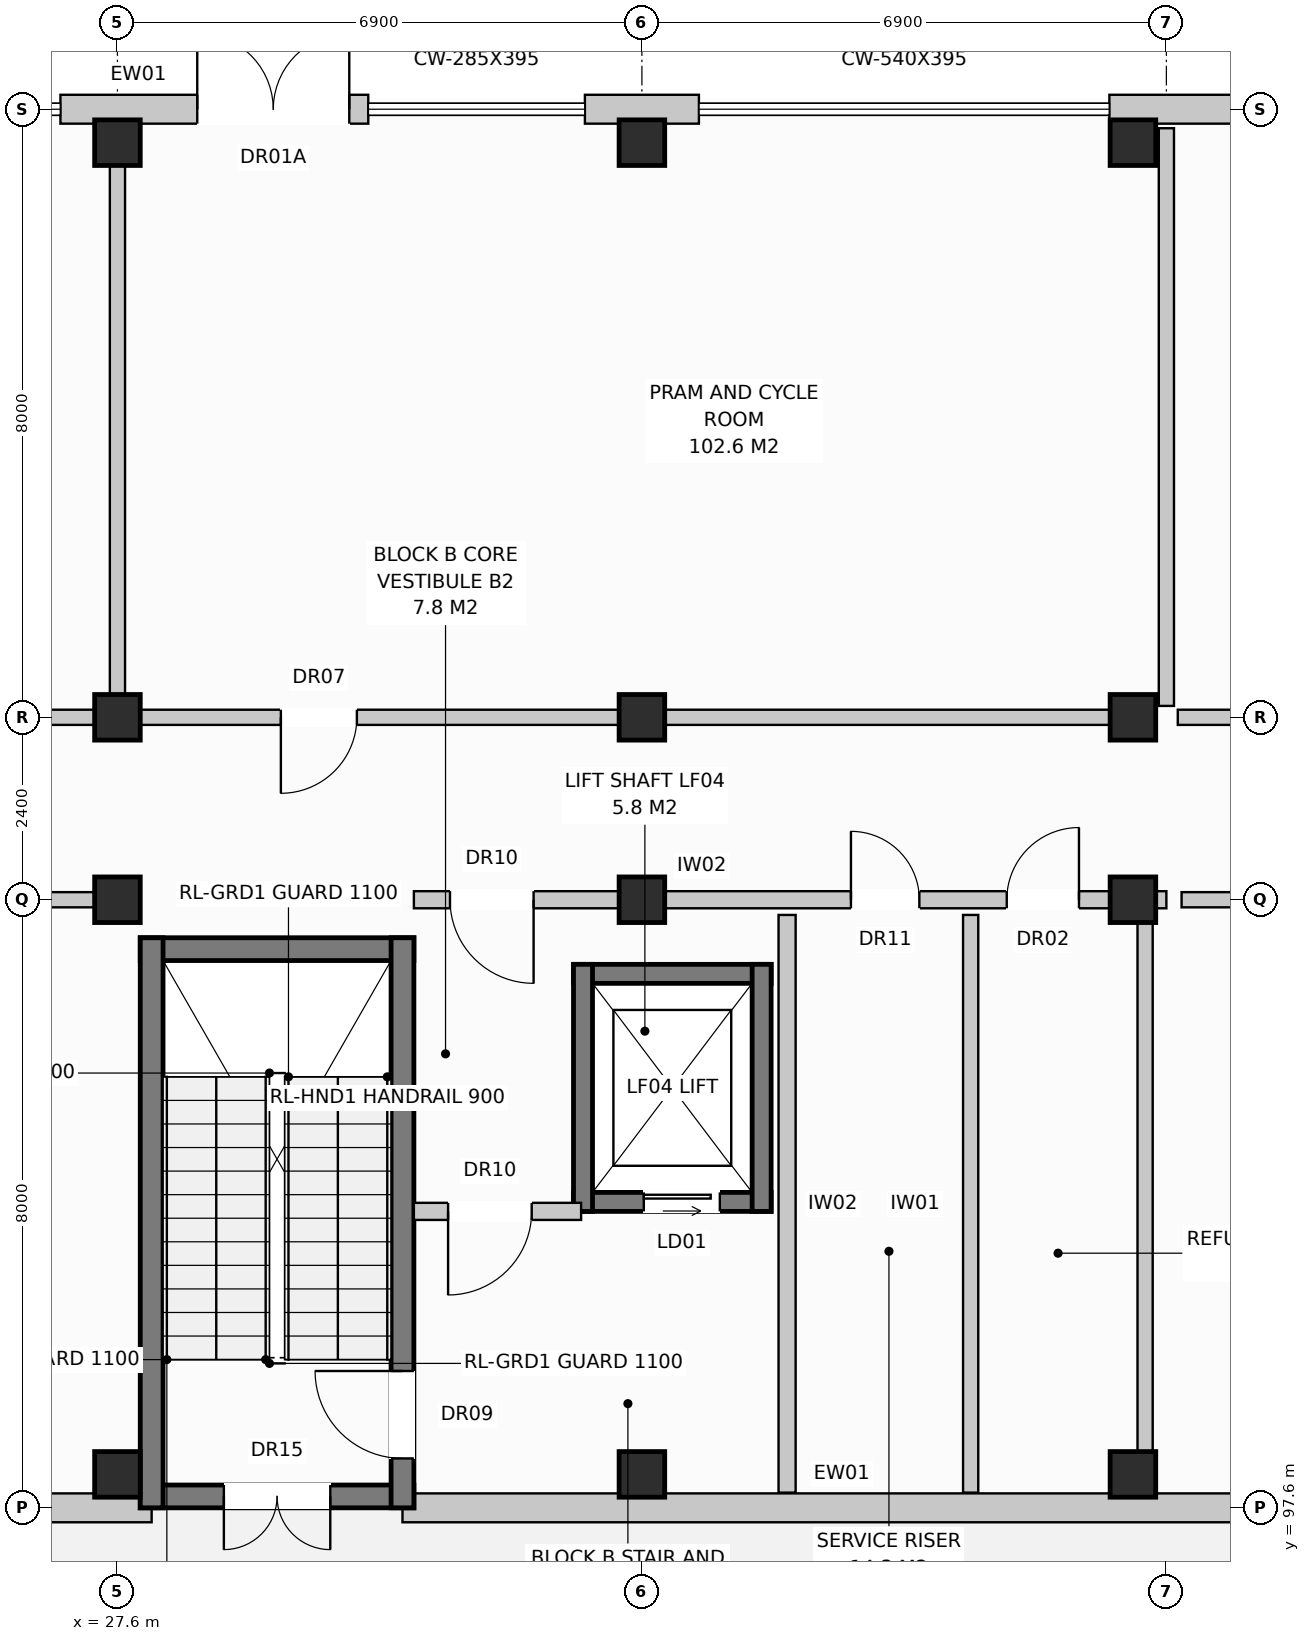
"""IFC4 building model, lengths in metres.
Left out: names, types, materials, properties, quantities, classifications, styles, units other than length and angle.
Written with IfcOpenShell. Run it as: python <this file> out.ifc"""

import sys

from ifc_helpers import new_model, si_unit, direction, frame, frame_2d, origin, origin_with_axes, origin_2d, place, context, subcontext, project, spatial, rectangle, extrude, element, fill, save


model = new_model("IFC4")
c1 = context("Model", 3, precision=1e-05, world=origin(), true_north=direction((0.0, 1.0)))
c2 = subcontext(c1, "Body", "Model", "MODEL_VIEW")
j1 = project(units=[si_unit("LENGTHUNIT", "METRE"), si_unit("PLANEANGLEUNIT", "RADIAN")], contexts=[c1])
p1 = place(None, origin())
s1 = spatial("IfcSite", under=j1, at=p1, CompositionType="ELEMENT")
p2 = place(p1, origin())
s2 = spatial("IfcBuilding", under=s1, at=p2, CompositionType="ELEMENT")
p3 = place(p2, origin())
s3 = spatial("IfcBuildingStorey", under=s2, at=p3, CompositionType="ELEMENT", Elevation=0.0)
for number, where, z_axis, x_axis in (
    (1, (27.6, 98.04, 0.0), (0.0, 0.0, 1.0), (1.0, 0.0, 0.0)),
    (2, (27.6, 105.6, 0.0), (0.0, 0.0, 1.0), (1.0, 0.0, 0.0)),
    (3, (27.6, 108.0, 0.0), (0.0, 0.0, 1.0), (1.0, 0.0, 0.0)),
    (4, (27.6, 115.56, 0.0), (0.0, 0.0, 1.0), (1.0, 0.0, 0.0)),
    (5, (34.5, 98.04, 0.0), (0.0, 0.0, 1.0), (1.0, 0.0, 0.0)),
    (6, (34.5, 105.6, 0.0), (0.0, 0.0, 1.0), (1.0, 0.0, 0.0)),
    (7, (34.5, 108.0, 0.0), (0.0, 0.0, 1.0), (1.0, 0.0, 0.0)),
    (8, (34.5, 115.56, 0.0), (0.0, 0.0, 1.0), (1.0, 0.0, 0.0)),
    (9, (40.96, 98.04, 0.0), (0.0, 0.0, 1.0), (1.0, 0.0, 0.0)),
    (10, (40.96, 105.6, 0.0), (0.0, 0.0, 1.0), (1.0, 0.0, 0.0)),
    (11, (40.96, 108.0, 0.0), (0.0, 0.0, 1.0), (1.0, 0.0, 0.0)),
    (12, (40.96, 115.56, 0.0), (0.0, 0.0, 1.0), (1.0, 0.0, 0.0)),
):
    element("IfcColumn", number, at=place(p3, frame(where, z_axis=z_axis, x_axis=x_axis)), inside=s3, PredefinedType="COLUMN", context=c2, shape_type="SweptSolid", body=[
        extrude(rectangle(XDim=0.6, YDim=0.6, at=origin_2d()), origin(), (0.0, 0.0, 1.0), 4.4),
    ])
p4 = place(p3, frame((26.65, 97.6, 0.0), z_axis=(0.0, 0.0, 1.0), x_axis=(1.0, 0.0, 0.0)))
e13 = element("IfcWall", 13, at=p4, inside=s3, PredefinedType="STANDARD", context=c2, shape_type="SweptSolid", body=[
    extrude(rectangle(XDim=1.4, YDim=0.38, at=frame_2d((0.7, 0.0))), origin(), (0.0, 0.0, 1.0), 4.12),
])
p5 = place(p3, frame((31.35, 97.6, 0.0), z_axis=(0.0, 0.0, 1.0), x_axis=(1.0, 0.0, 0.0)))
e14 = element("IfcWall", 14, at=p5, inside=s3, PredefinedType="STANDARD", context=c2, shape_type="SweptSolid", body=[
    extrude(rectangle(XDim=11.0, YDim=0.38, at=frame_2d((5.5, 0.0))), origin(), (0.0, 0.0, 1.0), 4.12),
])
p6 = place(p3, frame((26.85, 116.0, 0.0), z_axis=(0.0, 0.0, 1.0), x_axis=(1.0, 0.0, 0.0)))
e15 = element("IfcWall", 15, at=p6, inside=s3, PredefinedType="STANDARD", context=c2, shape_type="SweptSolid", body=[
    extrude(rectangle(XDim=4.05, YDim=0.38, at=frame_2d((2.025, 0.0))), origin(), (0.0, 0.0, 1.0), 4.12),
])
p7 = place(p6, frame((1.8, 0.0, 0.0)))
e16 = element("IfcOpeningElement", 16, at=p7, cuts=e15, PredefinedType="OPENING", context=c2, shape_type="SweptSolid", body=[
    extrude(rectangle(XDim=2.0, YDim=2.45, at=frame_2d((1.0, 1.225))), frame((0.0, 0.202, 0.0), z_axis=(0.0, -1.0, 0.0), x_axis=(1.0, 0.0, 0.0)), (0.0, 0.0, 1.0), 0.404),
])
p8 = place(p3, frame((33.75, 116.0, 0.0), z_axis=(0.0, 0.0, 1.0), x_axis=(1.0, 0.0, 0.0)))
e17 = element("IfcWall", 17, at=p8, inside=s3, PredefinedType="STANDARD", context=c2, shape_type="SweptSolid", body=[
    extrude(rectangle(XDim=1.5, YDim=0.38, at=frame_2d((0.75, 0.0))), origin(), (0.0, 0.0, 1.0), 4.12),
])
p9 = place(p3, frame((40.65, 116.0, 0.0), z_axis=(0.0, 0.0, 1.0), x_axis=(1.0, 0.0, 0.0)))
e18 = element("IfcWall", 18, at=p9, inside=s3, PredefinedType="STANDARD", context=c2, shape_type="SweptSolid", body=[
    extrude(rectangle(XDim=4.05, YDim=0.38, at=frame_2d((2.025, 0.0))), origin(), (0.0, 0.0, 1.0), 4.12),
])
p10 = place(p9, frame((1.8, 0.0, 0.0)))
e19 = element("IfcOpeningElement", 19, at=p10, cuts=e18, PredefinedType="OPENING", context=c2, shape_type="SweptSolid", body=[
    extrude(rectangle(XDim=2.0, YDim=2.45, at=frame_2d((1.0, 1.225))), frame((0.0, 0.202, 0.0), z_axis=(0.0, -1.0, 0.0), x_axis=(1.0, 0.0, 0.0)), (0.0, 0.0, 1.0), 0.404),
])
p11 = place(p3, frame((27.9, 97.75, 0.0), z_axis=(0.0, 0.0, 1.0), x_axis=(1.0, 0.0, 0.0)))
e20 = element("IfcWall", 20, at=p11, inside=s3, PredefinedType="SHEAR", context=c2, shape_type="SweptSolid", body=[
    extrude(rectangle(XDim=3.6, YDim=0.3, at=frame_2d((1.8, 0.0))), origin(), (0.0, 0.0, 1.0), 4.12),
])
p12 = place(p11, frame((1.1, 0.0, 0.0)))
e21 = element("IfcOpeningElement", 21, at=p12, cuts=e20, PredefinedType="OPENING", context=c2, shape_type="SweptSolid", body=[
    extrude(rectangle(XDim=1.4, YDim=2.25, at=frame_2d((0.7, 1.125))), frame((0.0, 0.162, 0.0), z_axis=(0.0, -1.0, 0.0), x_axis=(1.0, 0.0, 0.0)), (0.0, 0.0, 1.0), 0.324),
])
p13 = place(p3, frame((27.9, 104.95, 0.0), z_axis=(0.0, 0.0, 1.0), x_axis=(1.0, 0.0, 0.0)))
e22 = element("IfcWall", 22, at=p13, inside=s3, PredefinedType="SHEAR", context=c2, shape_type="SweptSolid", body=[
    extrude(rectangle(XDim=3.6, YDim=0.3, at=frame_2d((1.8, 0.0))), origin(), (0.0, 0.0, 1.0), 4.12),
])
p14 = place(p3, frame((28.05, 97.6, 0.0), z_axis=(0.0, 0.0, 1.0), x_axis=(0.0, 1.0, 0.0)))
e23 = element("IfcWall", 23, at=p14, inside=s3, PredefinedType="SHEAR", context=c2, shape_type="SweptSolid", body=[
    extrude(rectangle(XDim=7.5, YDim=0.3, at=frame_2d((3.75, 0.0))), origin(), (0.0, 0.0, 1.0), 4.12),
])
p15 = place(p3, frame((31.35, 97.6, 0.0), z_axis=(0.0, 0.0, 1.0), x_axis=(0.0, 1.0, 0.0)))
e24 = element("IfcWall", 24, at=p15, inside=s3, PredefinedType="SHEAR", context=c2, shape_type="SweptSolid", body=[
    extrude(rectangle(XDim=7.5, YDim=0.3, at=frame_2d((3.75, 0.0))), origin(), (0.0, 0.0, 1.0), 4.12),
])
p16 = place(p15, frame((0.65, 0.0, 0.0)))
e25 = element("IfcOpeningElement", 25, at=p16, cuts=e24, PredefinedType="OPENING", context=c2, shape_type="SweptSolid", body=[
    extrude(rectangle(XDim=1.15, YDim=2.15, at=frame_2d((0.575, 1.075))), frame((0.0, 0.162, 0.0), z_axis=(0.0, -1.0, 0.0), x_axis=(1.0, 0.0, 0.0)), (0.0, 0.0, 1.0), 0.324),
])
p17 = place(p3, frame((33.6, 101.625, 0.0), z_axis=(0.0, 0.0, 1.0), x_axis=(1.0, 0.0, 0.0)))
e26 = element("IfcWall", 26, at=p17, inside=s3, PredefinedType="SHEAR", context=c2, shape_type="SweptSolid", body=[
    extrude(rectangle(XDim=2.6, YDim=0.25, at=frame_2d((1.3, 0.0))), origin(), (0.0, 0.0, 1.0), 4.12),
])
p18 = place(p17, frame((0.925, 0.0, 0.0)))
e27 = element("IfcOpeningElement", 27, at=p18, cuts=e26, PredefinedType="OPENING", context=c2, shape_type="SweptSolid", body=[
    extrude(rectangle(XDim=1.0, YDim=2.1, at=frame_2d((0.5, 1.05))), frame((0.0, 0.137, 0.0), z_axis=(0.0, -1.0, 0.0), x_axis=(1.0, 0.0, 0.0)), (0.0, 0.0, 1.0), 0.274),
])
p19 = place(p3, frame((33.6, 104.625, 0.0), z_axis=(0.0, 0.0, 1.0), x_axis=(1.0, 0.0, 0.0)))
e28 = element("IfcWall", 28, at=p19, inside=s3, PredefinedType="SHEAR", context=c2, shape_type="SweptSolid", body=[
    extrude(rectangle(XDim=2.6, YDim=0.25, at=frame_2d((1.3, 0.0))), origin(), (0.0, 0.0, 1.0), 4.12),
])
for number, where, z_axis, x_axis in (
    (29, (33.725, 101.5, 0.0), (0.0, 0.0, 1.0), (0.0, 1.0, 0.0)),
    (30, (36.075, 101.5, 0.0), (0.0, 0.0, 1.0), (0.0, 1.0, 0.0)),
):
    element("IfcWall", number, at=place(p3, frame(where, z_axis=z_axis, x_axis=x_axis)), inside=s3, PredefinedType="SHEAR", context=c2, shape_type="SweptSolid", body=[
        extrude(rectangle(XDim=3.25, YDim=0.25, at=frame_2d((1.625, 0.0))), origin(), (0.0, 0.0, 1.0), 4.12),
    ])
p20 = place(p3, frame((36.41, 97.8, 0.0), z_axis=(0.0, 0.0, 1.0), x_axis=(0.0, 1.0, 0.0)))
e31 = element("IfcWall", 31, at=p20, inside=s3, PredefinedType="PARTITIONING", context=c2, shape_type="SweptSolid", body=[
    extrude(rectangle(XDim=7.6, YDim=0.225, at=frame_2d((3.8, 0.0))), origin(), (0.0, 0.0, 1.0), 4.12),
])
p21 = place(p3, frame((31.5, 101.5, 0.0), z_axis=(0.0, 0.0, 1.0), x_axis=(1.0, 0.0, 0.0)))
e32 = element("IfcWall", 32, at=p21, inside=s3, PredefinedType="PARTITIONING", context=c2, shape_type="SweptSolid", body=[
    extrude(rectangle(XDim=2.2, YDim=0.225, at=frame_2d((1.1, 0.0))), origin(), (0.0, 0.0, 1.0), 4.12),
])
p22 = place(p21, frame((0.45, 0.0, 0.0)))
e33 = element("IfcOpeningElement", 33, at=p22, cuts=e32, PredefinedType="OPENING", context=c2, shape_type="SweptSolid", body=[
    extrude(rectangle(XDim=1.1, YDim=2.15, at=frame_2d((0.55, 1.075))), frame((0.0, 0.125, 0.0), z_axis=(0.0, -1.0, 0.0), x_axis=(1.0, 0.0, 0.0)), (0.0, 0.0, 1.0), 0.249),
])
p23 = place(p3, frame((27.6, 105.6, 0.0), z_axis=(0.0, 0.0, 1.0), x_axis=(1.0, 0.0, 0.0)))
e34 = element("IfcWall", 34, at=p23, inside=s3, PredefinedType="PARTITIONING", context=c2, shape_type="SweptSolid", body=[
    extrude(rectangle(XDim=0.3, YDim=0.225, at=frame_2d((0.15, 0.0))), origin(), (0.0, 0.0, 1.0), 4.12),
])
for number, where, z_axis, x_axis in (
    (35, (38.825, 97.8, 0.0), (0.0, 0.0, 1.0), (0.0, 1.0, 0.0)),
    (36, (41.12, 97.8, 0.0), (0.0, 0.0, 1.0), (0.0, 1.0, 0.0)),
):
    element("IfcWall", number, at=place(p3, frame(where, z_axis=z_axis, x_axis=x_axis)), inside=s3, PredefinedType="PARTITIONING", context=c2, shape_type="SweptSolid", body=[
        extrude(rectangle(XDim=7.6, YDim=0.2, at=frame_2d((3.8, 0.0))), origin(), (0.0, 0.0, 1.0), 4.12),
    ])
p24 = place(p3, frame((31.5, 105.6, 0.0), z_axis=(0.0, 0.0, 1.0), x_axis=(1.0, 0.0, 0.0)))
e37 = element("IfcWall", 37, at=p24, inside=s3, PredefinedType="PARTITIONING", context=c2, shape_type="SweptSolid", body=[
    extrude(rectangle(XDim=9.9, YDim=0.225, at=frame_2d((4.95, 0.0))), origin(), (0.0, 0.0, 1.0), 3.56),
])
p25 = place(p24, frame((0.475, 0.0, 0.0)))
e38 = element("IfcOpeningElement", 38, at=p25, cuts=e37, PredefinedType="OPENING", context=c2, shape_type="SweptSolid", body=[
    extrude(rectangle(XDim=1.1, YDim=2.15, at=frame_2d((0.55, 1.075))), frame((0.0, 0.125, 0.0), z_axis=(0.0, -1.0, 0.0), x_axis=(1.0, 0.0, 0.0)), (0.0, 0.0, 1.0), 0.249),
])
p26 = place(p24, frame((5.75, 0.0, 0.0)))
e39 = element("IfcOpeningElement", 39, at=p26, cuts=e37, PredefinedType="OPENING", context=c2, shape_type="SweptSolid", body=[
    extrude(rectangle(XDim=0.9, YDim=2.1, at=frame_2d((0.45, 1.05))), frame((0.0, 0.125, 0.0), z_axis=(0.0, -1.0, 0.0), x_axis=(1.0, 0.0, 0.0)), (0.0, 0.0, 1.0), 0.249),
])
p27 = place(p24, frame((7.8, 0.0, 0.0)))
e40 = element("IfcOpeningElement", 40, at=p27, cuts=e37, PredefinedType="OPENING", context=c2, shape_type="SweptSolid", body=[
    extrude(rectangle(XDim=0.95, YDim=2.15, at=frame_2d((0.475, 1.075))), frame((0.0, 0.125, 0.0), z_axis=(0.0, -1.0, 0.0), x_axis=(1.0, 0.0, 0.0)), (0.0, 0.0, 1.0), 0.249),
])
p28 = place(p3, frame((13.95, 108.0, 0.0), z_axis=(0.0, 0.0, 1.0), x_axis=(1.0, 0.0, 0.0)))
e41 = element("IfcWall", 41, at=p28, inside=s3, PredefinedType="PARTITIONING", context=c2, shape_type="SweptSolid", body=[
    extrude(rectangle(XDim=13.5, YDim=0.2, at=frame_2d((6.75, 0.0))), origin(), (0.0, 0.0, 1.0), 3.56),
])
p29 = place(p28, frame((2.0, 0.0, 0.0)))
e42 = element("IfcOpeningElement", 42, at=p29, cuts=e41, PredefinedType="OPENING", context=c2, shape_type="SweptSolid", body=[
    extrude(rectangle(XDim=1.0, YDim=2.15, at=frame_2d((0.5, 1.075))), frame((0.0, 0.112, 0.0), z_axis=(0.0, -1.0, 0.0), x_axis=(1.0, 0.0, 0.0)), (0.0, 0.0, 1.0), 0.224),
])
p30 = place(p3, frame((27.6, 108.15, 0.0), z_axis=(0.0, 0.0, 1.0), x_axis=(0.0, 1.0, 0.0)))
e43 = element("IfcWall", 43, at=p30, inside=s3, PredefinedType="PARTITIONING", context=c2, shape_type="SweptSolid", body=[
    extrude(rectangle(XDim=7.6, YDim=0.2, at=frame_2d((3.8, 0.0))), origin(), (0.0, 0.0, 1.0), 4.12),
])
p31 = place(p3, frame((27.75, 108.0, 0.0), z_axis=(0.0, 0.0, 1.0), x_axis=(1.0, 0.0, 0.0)))
e44 = element("IfcWall", 44, at=p31, inside=s3, PredefinedType="PARTITIONING", context=c2, shape_type="SweptSolid", body=[
    extrude(rectangle(XDim=13.5, YDim=0.2, at=frame_2d((6.75, 0.0))), origin(), (0.0, 0.0, 1.0), 3.56),
])
p32 = place(p31, frame((2.0, 0.0, 0.0)))
e45 = element("IfcOpeningElement", 45, at=p32, cuts=e44, PredefinedType="OPENING", context=c2, shape_type="SweptSolid", body=[
    extrude(rectangle(XDim=1.0, YDim=2.15, at=frame_2d((0.5, 1.075))), frame((0.0, 0.112, 0.0), z_axis=(0.0, -1.0, 0.0), x_axis=(1.0, 0.0, 0.0)), (0.0, 0.0, 1.0), 0.224),
])
p33 = place(p3, frame((41.4, 108.15, 0.0), z_axis=(0.0, 0.0, 1.0), x_axis=(0.0, 1.0, 0.0)))
e46 = element("IfcWall", 46, at=p33, inside=s3, PredefinedType="PARTITIONING", context=c2, shape_type="SweptSolid", body=[
    extrude(rectangle(XDim=7.6, YDim=0.2, at=frame_2d((3.8, 0.0))), origin(), (0.0, 0.0, 1.0), 4.12),
])
p34 = place(p3, frame((41.55, 108.0, 0.0), z_axis=(0.0, 0.0, 1.0), x_axis=(1.0, 0.0, 0.0)))
e47 = element("IfcWall", 47, at=p34, inside=s3, PredefinedType="PARTITIONING", context=c2, shape_type="SweptSolid", body=[
    extrude(rectangle(XDim=6.6, YDim=0.2, at=frame_2d((3.3, 0.0))), origin(), (0.0, 0.0, 1.0), 3.56),
])
p35 = place(p34, frame((2.0, 0.0, 0.0)))
e48 = element("IfcOpeningElement", 48, at=p35, cuts=e47, PredefinedType="OPENING", context=c2, shape_type="SweptSolid", body=[
    extrude(rectangle(XDim=1.0, YDim=2.15, at=frame_2d((0.5, 1.075))), frame((0.0, 0.112, 0.0), z_axis=(0.0, -1.0, 0.0), x_axis=(1.0, 0.0, 0.0)), (0.0, 0.0, 1.0), 0.224),
])
p36 = place(p3, frame((20.9, 105.6, 0.0), z_axis=(0.0, 0.0, 1.0), x_axis=(1.0, 0.0, 0.0)))
e49 = element("IfcWall", 49, at=p36, inside=s3, PredefinedType="PARTITIONING", context=c2, shape_type="SweptSolid", body=[
    extrude(rectangle(XDim=6.5, YDim=0.2, at=frame_2d((3.25, 0.0))), origin(), (0.0, 0.0, 1.0), 3.56),
])
p37 = place(p36, frame((1.9, 0.0, 0.0)))
e50 = element("IfcOpeningElement", 50, at=p37, cuts=e49, PredefinedType="OPENING", context=c2, shape_type="SweptSolid", body=[
    extrude(rectangle(XDim=0.95, YDim=2.15, at=frame_2d((0.475, 1.075))), frame((0.0, 0.112, 0.0), z_axis=(0.0, -1.0, 0.0), x_axis=(1.0, 0.0, 0.0)), (0.0, 0.0, 1.0), 0.224),
])
p38 = place(p3, frame((41.6, 105.6, 0.0), z_axis=(0.0, 0.0, 1.0), x_axis=(1.0, 0.0, 0.0)))
e51 = element("IfcWall", 51, at=p38, inside=s3, PredefinedType="PARTITIONING", context=c2, shape_type="SweptSolid", body=[
    extrude(rectangle(XDim=13.35, YDim=0.2, at=frame_2d((6.675, 0.0))), origin(), (0.0, 0.0, 1.0), 3.56),
])
p39 = place(p38, frame((1.9, 0.0, 0.0)))
e52 = element("IfcOpeningElement", 52, at=p39, cuts=e51, PredefinedType="OPENING", context=c2, shape_type="SweptSolid", body=[
    extrude(rectangle(XDim=0.95, YDim=2.15, at=frame_2d((0.475, 1.075))), frame((0.0, 0.112, 0.0), z_axis=(0.0, -1.0, 0.0), x_axis=(1.0, 0.0, 0.0)), (0.0, 0.0, 1.0), 0.224),
])
p40 = place(p7, origin_with_axes())
e53 = element("IfcDoor", 53, at=p40, inside=s3, OperationType="DOUBLE_DOOR_SINGLE_SWING", PredefinedType="DOOR", context=c2, shape_type="SweptSolid", body=[
    extrude(rectangle(XDim=2.0, YDim=2.45, at=frame_2d((1.0, 1.225))), frame((0.0, 0.025, 0.0), z_axis=(0.0, -1.0, 0.0), x_axis=(1.0, 0.0, 0.0)), (0.0, 0.0, 1.0), 0.05),
])
fill(e16, e53)
p41 = place(p12, frame((1.4, 0.0, 0.0), z_axis=(0.0, 0.0, 1.0), x_axis=(-1.0, 0.0, 0.0)))
e54 = element("IfcDoor", 54, at=p41, inside=s3, OperationType="DOUBLE_DOOR_SINGLE_SWING", PredefinedType="DOOR", context=c2, shape_type="SweptSolid", body=[
    extrude(rectangle(XDim=1.4, YDim=2.25, at=frame_2d((0.7, 1.125))), frame((0.0, 0.025, 0.0), z_axis=(0.0, -1.0, 0.0), x_axis=(1.0, 0.0, 0.0)), (0.0, 0.0, 1.0), 0.05),
])
fill(e21, e54)
p42 = place(p16, origin_with_axes())
e55 = element("IfcDoor", 55, at=p42, inside=s3, OperationType="SINGLE_SWING_RIGHT", PredefinedType="DOOR", context=c2, shape_type="SweptSolid", body=[
    extrude(rectangle(XDim=1.15, YDim=2.15, at=frame_2d((0.575, 1.075))), frame((0.0, 0.025, 0.0), z_axis=(0.0, -1.0, 0.0), x_axis=(1.0, 0.0, 0.0)), (0.0, 0.0, 1.0), 0.05),
])
fill(e25, e55)
p43 = place(p18, origin_with_axes())
e56 = element("IfcDoor", 56, at=p43, inside=s3, OperationType="SLIDING_TO_LEFT", PredefinedType="DOOR", context=c2, shape_type="SweptSolid", body=[
    extrude(rectangle(XDim=1.0, YDim=2.1, at=frame_2d((0.5, 1.05))), frame((0.0, 0.025, 0.0), z_axis=(0.0, -1.0, 0.0), x_axis=(1.0, 0.0, 0.0)), (0.0, 0.0, 1.0), 0.05),
])
fill(e27, e56)
p44 = place(p22, frame((1.1, 0.0, 0.0), z_axis=(0.0, 0.0, 1.0), x_axis=(-1.0, 0.0, 0.0)))
e57 = element("IfcDoor", 57, at=p44, inside=s3, OperationType="SINGLE_SWING_LEFT", PredefinedType="DOOR", context=c2, shape_type="SweptSolid", body=[
    extrude(rectangle(XDim=1.1, YDim=2.15, at=frame_2d((0.55, 1.075))), frame((0.0, 0.025, 0.0), z_axis=(0.0, -1.0, 0.0), x_axis=(1.0, 0.0, 0.0)), (0.0, 0.0, 1.0), 0.05),
])
fill(e33, e57)
p45 = place(p25, frame((1.1, 0.0, 0.0), z_axis=(0.0, 0.0, 1.0), x_axis=(-1.0, 0.0, 0.0)))
e58 = element("IfcDoor", 58, at=p45, inside=s3, OperationType="SINGLE_SWING_RIGHT", PredefinedType="DOOR", context=c2, shape_type="SweptSolid", body=[
    extrude(rectangle(XDim=1.1, YDim=2.15, at=frame_2d((0.55, 1.075))), frame((0.0, 0.025, 0.0), z_axis=(0.0, -1.0, 0.0), x_axis=(1.0, 0.0, 0.0)), (0.0, 0.0, 1.0), 0.05),
])
fill(e38, e58)
p46 = place(p26, origin_with_axes())
e59 = element("IfcDoor", 59, at=p46, inside=s3, OperationType="SINGLE_SWING_LEFT", PredefinedType="DOOR", context=c2, shape_type="SweptSolid", body=[
    extrude(rectangle(XDim=0.9, YDim=2.1, at=frame_2d((0.45, 1.05))), frame((0.0, 0.025, 0.0), z_axis=(0.0, -1.0, 0.0), x_axis=(1.0, 0.0, 0.0)), (0.0, 0.0, 1.0), 0.05),
])
fill(e39, e59)
p47 = place(p27, origin_with_axes())
e60 = element("IfcDoor", 60, at=p47, inside=s3, OperationType="SINGLE_SWING_RIGHT", PredefinedType="DOOR", context=c2, shape_type="SweptSolid", body=[
    extrude(rectangle(XDim=0.95, YDim=2.15, at=frame_2d((0.475, 1.075))), frame((0.0, 0.025, 0.0), z_axis=(0.0, -1.0, 0.0), x_axis=(1.0, 0.0, 0.0)), (0.0, 0.0, 1.0), 0.05),
])
fill(e40, e60)
p48 = place(p32, frame((1.0, 0.0, 0.0), z_axis=(0.0, 0.0, 1.0), x_axis=(-1.0, 0.0, 0.0)))
e61 = element("IfcDoor", 61, at=p48, inside=s3, OperationType="SINGLE_SWING_LEFT", PredefinedType="DOOR", context=c2, shape_type="SweptSolid", body=[
    extrude(rectangle(XDim=1.0, YDim=2.15, at=frame_2d((0.5, 1.075))), frame((0.0, 0.025, 0.0), z_axis=(0.0, -1.0, 0.0), x_axis=(1.0, 0.0, 0.0)), (0.0, 0.0, 1.0), 0.05),
])
fill(e45, e61)
save(model, sys.argv[1])
